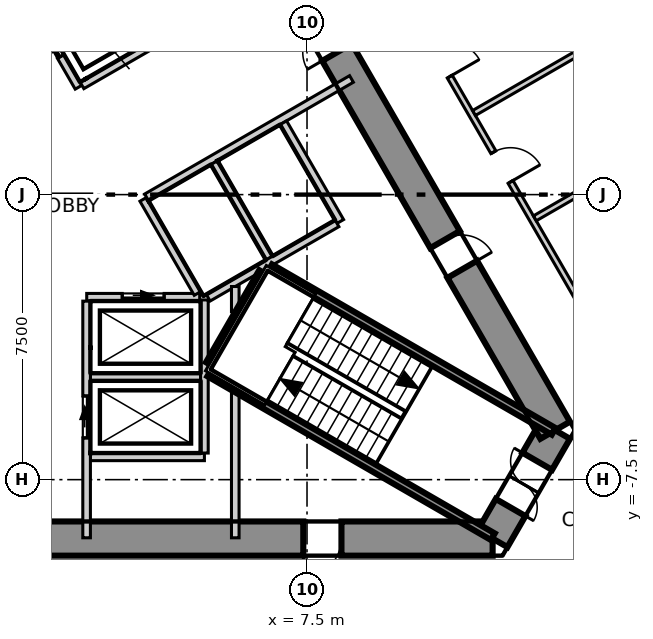
"""IFC4 building model, lengths in metres.
Left out: names, types, materials, properties, quantities, classifications, styles, units other than length and angle.
Written with IfcOpenShell. Run it as: python <this file> out.ifc"""

import sys

from ifc_helpers import new_model, si_unit, direction, frame, frame_2d, origin, place, context, subcontext, project, spatial, polyline, rectangle, outline, extrude, element, fill, save


model = new_model("IFC4")
c1 = context("Model", 3, precision=1e-05, world=origin(), true_north=direction((0.0, 1.0)))
c2 = subcontext(c1, "Body", "Model", "MODEL_VIEW")
j1 = project(units=[si_unit("LENGTHUNIT", "METRE"), si_unit("PLANEANGLEUNIT", "RADIAN")], contexts=[c1])
p1 = place(None, origin())
s1 = spatial("IfcSite", under=j1, at=p1, CompositionType="ELEMENT")
p2 = place(p1, origin())
s2 = spatial("IfcBuilding", under=s1, at=p2, CompositionType="ELEMENT")
p3 = place(p2, frame((0.0, 0.0, 71.3)))
s3 = spatial("IfcBuildingStorey", under=s2, at=p3, CompositionType="ELEMENT", Elevation=71.3)
p4 = place(p3, frame((-12.384, -9.05, -0.3), z_axis=(0.0, 0.0, 1.0), x_axis=(1.0, 0.0, 0.0)))
e1 = element("IfcWall", 1, at=p4, inside=s3, PredefinedType="SHEAR", context=c2, shape_type="SweptSolid", body=[
    extrude(outline(polyline([(-0.26, -0.45), (1.685, -0.45), (3.63, -0.45), (5.576, -0.45), (7.521, -0.45), (9.466, -0.45), (11.411, -0.45), (13.357, -0.45), (15.302, -0.45), (17.247, -0.45), (19.192, -0.45), (21.138, -0.45), (23.083, -0.45), (25.028, -0.45), (24.508, 0.45), (22.643, 0.45), (20.778, 0.45), (18.912, 0.45), (17.047, 0.45), (15.182, 0.45), (13.317, 0.45), (11.451, 0.45), (9.586, 0.45), (7.721, 0.45), (5.856, 0.45), (3.99, 0.45), (2.125, 0.45), (0.26, 0.45), (-0.26, -0.45)])), origin(), (0.0, 0.0, 1.0), 4.0),
])
p5 = place(p4, frame((8.548, 0.0, 0.3)))
e2 = element("IfcOpeningElement", 2, at=p5, cuts=e1, PredefinedType="OPENING", context=c2, shape_type="SweptSolid", body=[
    extrude(rectangle(XDim=0.9, YDim=2.1, at=frame_2d((0.45, 1.05))), frame((0.0, 0.46, 0.0), z_axis=(0.0, -1.0, 0.0), x_axis=(1.0, 0.0, 0.0)), (0.0, 0.0, 1.0), 0.92),
])
p6 = place(p4, frame((19.788, 0.0, 0.3)))
e3 = element("IfcOpeningElement", 3, at=p6, cuts=e1, PredefinedType="OPENING", context=c2, shape_type="SweptSolid", body=[
    extrude(rectangle(XDim=1.0, YDim=2.1, at=frame_2d((0.5, 1.05))), frame((0.0, 0.46, 0.0), z_axis=(0.0, -1.0, 0.0), x_axis=(1.0, 0.0, 0.0)), (0.0, 0.0, 1.0), 0.92),
])
p7 = place(p3, frame((12.384, -9.05, -0.3), z_axis=(0.0, 0.0, 1.0), x_axis=(0.500111984565, 0.865960739811, 0.0)))
e4 = element("IfcWall", 4, at=p7, inside=s3, PredefinedType="SHEAR", context=c2, shape_type="SweptSolid", body=[
    extrude(outline(polyline([(-0.26, -0.45), (1.646, -0.449), (3.551, -0.449), (3.031, 0.45), (1.646, 0.45), (0.26, 0.45), (-0.26, -0.45)])), origin(), (0.0, 0.0, 1.0), 4.0),
])
p8 = place(p7, frame((0.946, 0.0, 0.3)))
e5 = element("IfcOpeningElement", 5, at=p8, cuts=e4, PredefinedType="OPENING", context=c2, shape_type="SweptSolid", body=[
    extrude(rectangle(XDim=1.4, YDim=2.1, at=frame_2d((0.7, 1.05))), frame((0.0, 0.46, 0.0), z_axis=(0.0, -1.0, 0.0), x_axis=(1.0, 0.0, 0.0)), (0.0, 0.0, 1.0), 0.92),
])
p9 = place(p3, frame((14.03, -6.2, -0.3), z_axis=(0.0, 0.0, 1.0), x_axis=(-0.500026485275, 0.866010111964, 0.0)))
e6 = element("IfcWall", 6, at=p9, inside=s3, PredefinedType="SHEAR", context=c2, shape_type="SweptSolid", body=[
    extrude(outline(polyline([(-0.26, -0.449), (1.685, -0.449), (3.63, -0.449), (5.576, -0.449), (7.521, -0.449), (9.466, -0.449), (11.411, -0.449), (13.357, -0.449), (15.302, -0.449), (17.247, -0.45), (19.192, -0.45), (21.138, -0.45), (23.083, -0.45), (25.028, -0.45), (24.509, 0.449), (22.644, 0.449), (20.778, 0.449), (18.913, 0.449), (17.048, 0.449), (15.182, 0.449), (13.317, 0.449), (11.452, 0.449), (9.587, 0.449), (7.721, 0.45), (5.856, 0.45), (3.991, 0.45), (2.125, 0.45), (0.26, 0.45), (-0.26, -0.449)])), origin(), (0.0, 0.0, 1.0), 4.0),
])
p10 = place(p9, frame((11.484, 0.0, 0.3)))
e7 = element("IfcOpeningElement", 7, at=p10, cuts=e6, PredefinedType="OPENING", context=c2, shape_type="SweptSolid", body=[
    extrude(rectangle(XDim=1.8, YDim=2.1, at=frame_2d((0.9, 1.05))), frame((0.0, 0.46, 0.0), z_axis=(0.0, -1.0, 0.0), x_axis=(1.0, 0.0, 0.0)), (0.0, 0.0, 1.0), 0.92),
])
p11 = place(p9, frame((4.892, 0.0, 0.3)))
e8 = element("IfcOpeningElement", 8, at=p11, cuts=e6, PredefinedType="OPENING", context=c2, shape_type="SweptSolid", body=[
    extrude(rectangle(XDim=0.9, YDim=2.1, at=frame_2d((0.45, 1.05))), frame((0.0, 0.46, 0.0), z_axis=(0.0, -1.0, 0.0), x_axis=(1.0, 0.0, 0.0)), (0.0, 0.0, 1.0), 0.92),
])
p12 = place(p9, frame((18.976, 0.0, 0.3)))
e9 = element("IfcOpeningElement", 9, at=p12, cuts=e6, PredefinedType="OPENING", context=c2, shape_type="SweptSolid", body=[
    extrude(rectangle(XDim=0.9, YDim=2.1, at=frame_2d((0.45, 1.05))), frame((0.0, 0.46, 0.0), z_axis=(0.0, -1.0, 0.0), x_axis=(1.0, 0.0, 0.0)), (0.0, 0.0, 1.0), 0.92),
])
p13 = place(p3, frame((33.779, -15.662, 0.0), z_axis=(0.0, 0.0, 1.0), x_axis=(-0.500000131003, 0.86602532815, 0.0)))
e10 = element("IfcWall", 10, at=p13, inside=s3, PredefinedType="ELEMENTEDWALL", context=c2, shape_type="SweptSolid", body=[
    extrude(rectangle(XDim=60.886, YDim=0.2, at=frame_2d((30.443, 0.0))), origin(), (0.0, 0.0, 1.0), 3.7),
])
p14 = place(p13, frame((2.147, 0.0, 0.9)))
e11 = element("IfcOpeningElement", 11, at=p14, cuts=e10, PredefinedType="OPENING", context=c2, shape_type="SweptSolid", body=[
    extrude(rectangle(XDim=5.6, YDim=2.5, at=frame_2d((2.8, 1.25))), frame((0.0, 0.11, 0.0), z_axis=(0.0, -1.0, 0.0), x_axis=(1.0, 0.0, 0.0)), (0.0, 0.0, 1.0), 0.22),
])
p15 = place(p13, frame((9.434, 0.0, 0.9)))
e12 = element("IfcOpeningElement", 12, at=p15, cuts=e10, PredefinedType="OPENING", context=c2, shape_type="SweptSolid", body=[
    extrude(rectangle(XDim=5.6, YDim=2.5, at=frame_2d((2.8, 1.25))), frame((0.0, 0.11, 0.0), z_axis=(0.0, -1.0, 0.0), x_axis=(1.0, 0.0, 0.0)), (0.0, 0.0, 1.0), 0.22),
])
p16 = place(p13, frame((16.722, 0.0, 0.9)))
e13 = element("IfcOpeningElement", 13, at=p16, cuts=e10, PredefinedType="OPENING", context=c2, shape_type="SweptSolid", body=[
    extrude(rectangle(XDim=5.6, YDim=2.5, at=frame_2d((2.8, 1.25))), frame((0.0, 0.11, 0.0), z_axis=(0.0, -1.0, 0.0), x_axis=(1.0, 0.0, 0.0)), (0.0, 0.0, 1.0), 0.22),
])
p17 = place(p13, frame((24.009, 0.0, 0.9)))
e14 = element("IfcOpeningElement", 14, at=p17, cuts=e10, PredefinedType="OPENING", context=c2, shape_type="SweptSolid", body=[
    extrude(rectangle(XDim=5.6, YDim=2.5, at=frame_2d((2.8, 1.25))), frame((0.0, 0.11, 0.0), z_axis=(0.0, -1.0, 0.0), x_axis=(1.0, 0.0, 0.0)), (0.0, 0.0, 1.0), 0.22),
])
p18 = place(p13, frame((31.297, 0.0, 0.9)))
e15 = element("IfcOpeningElement", 15, at=p18, cuts=e10, PredefinedType="OPENING", context=c2, shape_type="SweptSolid", body=[
    extrude(rectangle(XDim=5.6, YDim=2.5, at=frame_2d((2.8, 1.25))), frame((0.0, 0.11, 0.0), z_axis=(0.0, -1.0, 0.0), x_axis=(1.0, 0.0, 0.0)), (0.0, 0.0, 1.0), 0.22),
])
p19 = place(p13, frame((38.584, 0.0, 0.9)))
e16 = element("IfcOpeningElement", 16, at=p19, cuts=e10, PredefinedType="OPENING", context=c2, shape_type="SweptSolid", body=[
    extrude(rectangle(XDim=5.6, YDim=2.5, at=frame_2d((2.8, 1.25))), frame((0.0, 0.11, 0.0), z_axis=(0.0, -1.0, 0.0), x_axis=(1.0, 0.0, 0.0)), (0.0, 0.0, 1.0), 0.22),
])
p20 = place(p13, frame((45.872, 0.0, 0.9)))
e17 = element("IfcOpeningElement", 17, at=p20, cuts=e10, PredefinedType="OPENING", context=c2, shape_type="SweptSolid", body=[
    extrude(rectangle(XDim=5.6, YDim=2.5, at=frame_2d((2.8, 1.25))), frame((0.0, 0.11, 0.0), z_axis=(0.0, -1.0, 0.0), x_axis=(1.0, 0.0, 0.0)), (0.0, 0.0, 1.0), 0.22),
])
p21 = place(p13, frame((53.16, 0.0, 0.9)))
e18 = element("IfcOpeningElement", 18, at=p21, cuts=e10, PredefinedType="OPENING", context=c2, shape_type="SweptSolid", body=[
    extrude(rectangle(XDim=5.6, YDim=2.5, at=frame_2d((2.8, 1.25))), frame((0.0, 0.11, 0.0), z_axis=(0.0, -1.0, 0.0), x_axis=(1.0, 0.0, 0.0)), (0.0, 0.0, 1.0), 0.22),
])
p22 = place(p3, frame((0.075, 22.47, 0.0), z_axis=(0.0, 0.0, 1.0), x_axis=(0.500002280369, -0.866024087209, 0.0)))
e19 = element("IfcWall", 19, at=p22, inside=s3, PredefinedType="PARTITIONING", context=c2, shape_type="SweptSolid", body=[
    extrude(rectangle(XDim=38.844, YDim=0.15, at=frame_2d((19.422, 0.0))), origin(), (0.0, 0.0, 1.0), 3.7),
])
p23 = place(p22, frame((35.944, 0.0, 0.0)))
e20 = element("IfcOpeningElement", 20, at=p23, cuts=e19, PredefinedType="OPENING", context=c2, shape_type="SweptSolid", body=[
    extrude(rectangle(XDim=1.1, YDim=2.1, at=frame_2d((0.55, 1.05))), frame((0.0, 0.085, 0.0), z_axis=(0.0, -1.0, 0.0), x_axis=(1.0, 0.0, 0.0)), (0.0, 0.0, 1.0), 0.17),
])
p24 = place(p22, frame((29.848, 0.0, 0.0)))
e21 = element("IfcOpeningElement", 21, at=p24, cuts=e19, PredefinedType="OPENING", context=c2, shape_type="SweptSolid", body=[
    extrude(rectangle(XDim=1.0, YDim=2.1, at=frame_2d((0.5, 1.05))), frame((0.0, 0.085, 0.0), z_axis=(0.0, -1.0, 0.0), x_axis=(1.0, 0.0, 0.0)), (0.0, 0.0, 1.0), 0.17),
])
p25 = place(p22, frame((14.46, 0.0, 0.0)))
e22 = element("IfcOpeningElement", 22, at=p25, cuts=e19, PredefinedType="OPENING", context=c2, shape_type="SweptSolid", body=[
    extrude(rectangle(XDim=1.1, YDim=2.1, at=frame_2d((0.55, 1.05))), frame((0.0, 0.085, 0.0), z_axis=(0.0, -1.0, 0.0), x_axis=(1.0, 0.0, 0.0)), (0.0, 0.0, 1.0), 0.17),
])
p26 = place(p22, frame((24.66, 0.0, 0.0)))
e23 = element("IfcOpeningElement", 23, at=p26, cuts=e19, PredefinedType="OPENING", context=c2, shape_type="SweptSolid", body=[
    extrude(rectangle(XDim=0.9, YDim=2.1, at=frame_2d((0.45, 1.05))), frame((0.0, 0.085, 0.0), z_axis=(0.0, -1.0, 0.0), x_axis=(1.0, 0.0, 0.0)), (0.0, 0.0, 1.0), 0.17),
])
p27 = place(p22, frame((21.46, 0.0, 0.0)))
e24 = element("IfcOpeningElement", 24, at=p27, cuts=e19, PredefinedType="OPENING", context=c2, shape_type="SweptSolid", body=[
    extrude(rectangle(XDim=0.9, YDim=2.1, at=frame_2d((0.45, 1.05))), frame((0.0, 0.085, 0.0), z_axis=(0.0, -1.0, 0.0), x_axis=(1.0, 0.0, 0.0)), (0.0, 0.0, 1.0), 0.17),
])
p28 = place(p22, frame((18.66, 0.0, 0.0)))
e25 = element("IfcOpeningElement", 25, at=p28, cuts=e19, PredefinedType="OPENING", context=c2, shape_type="SweptSolid", body=[
    extrude(rectangle(XDim=1.0, YDim=2.1, at=frame_2d((0.5, 1.05))), frame((0.0, 0.085, 0.0), z_axis=(0.0, -1.0, 0.0), x_axis=(1.0, 0.0, 0.0)), (0.0, 0.0, 1.0), 0.17),
])
p29 = place(p22, frame((6.785, 0.0, 0.0)))
e26 = element("IfcOpeningElement", 26, at=p29, cuts=e19, PredefinedType="OPENING", context=c2, shape_type="SweptSolid", body=[
    extrude(rectangle(XDim=1.0, YDim=2.1, at=frame_2d((0.5, 1.05))), frame((0.0, 0.085, 0.0), z_axis=(0.0, -1.0, 0.0), x_axis=(1.0, 0.0, 0.0)), (0.0, 0.0, 1.0), 0.17),
])
p30 = place(p22, frame((10.485, 0.0, 0.0)))
e27 = element("IfcOpeningElement", 27, at=p30, cuts=e19, PredefinedType="OPENING", context=c2, shape_type="SweptSolid", body=[
    extrude(rectangle(XDim=0.9, YDim=2.1, at=frame_2d((0.45, 1.05))), frame((0.0, 0.085, 0.0), z_axis=(0.0, -1.0, 0.0), x_axis=(1.0, 0.0, 0.0)), (0.0, 0.0, 1.0), 0.17),
])
p31 = place(p22, frame((1.796, 0.0, 0.0)))
e28 = element("IfcOpeningElement", 28, at=p31, cuts=e19, PredefinedType="OPENING", context=c2, shape_type="SweptSolid", body=[
    extrude(rectangle(XDim=1.1, YDim=2.1, at=frame_2d((0.55, 1.05))), frame((0.0, 0.085, 0.0), z_axis=(0.0, -1.0, 0.0), x_axis=(1.0, 0.0, 0.0)), (0.0, 0.0, 1.0), 0.17),
])
p32 = place(p3, frame((12.148, 8.76, 0.0), z_axis=(0.0, 0.0, 1.0), x_axis=(0.499970334739, -0.866042530354, 0.0)))
e29 = element("IfcWall", 29, at=p32, inside=s3, PredefinedType="PARTITIONING", context=c2, shape_type="SweptSolid", body=[
    extrude(rectangle(XDim=8.725, YDim=0.15, at=frame_2d((4.362, 0.0))), origin(), (0.0, 0.0, 1.0), 3.7),
])
p33 = place(p3, frame((11.895, 2.148, 0.0), z_axis=(0.0, 0.0, 1.0), x_axis=(0.866031223622, 0.49998991961, 0.0)))
e30 = element("IfcWall", 30, at=p33, inside=s3, PredefinedType="PARTITIONING", context=c2, shape_type="SweptSolid", body=[
    extrude(rectangle(XDim=3.45, YDim=0.15, at=frame_2d((1.725, 0.0))), origin(), (0.0, 0.0, 1.0), 3.7),
])
p34 = place(p3, frame((13.495, -0.624, 0.0), z_axis=(0.0, 0.0, 1.0), x_axis=(0.866002028202, 0.500040485511, 0.0)))
e31 = element("IfcWall", 31, at=p34, inside=s3, PredefinedType="PARTITIONING", context=c2, shape_type="SweptSolid", body=[
    extrude(rectangle(XDim=9.968, YDim=0.15, at=frame_2d((4.984, 0.0))), origin(), (0.0, 0.0, 1.0), 3.7),
])
p35 = place(p3, frame((1.8, -4.8, 0.0), z_axis=(0.0, 0.0, 1.0), x_axis=(1.0, 0.0, 0.0)))
e32 = element("IfcWall", 32, at=p35, inside=s3, PredefinedType="SOLIDWALL", context=c2, shape_type="SweptSolid", body=[
    extrude(rectangle(XDim=2.9, YDim=0.2, at=frame_2d((1.45, 0.0))), origin(), (0.0, 0.0, 1.0), 3.7),
])
p36 = place(p3, frame((1.8, -6.9, 0.0), z_axis=(0.0, 0.0, 1.0), x_axis=(1.0, 0.0, 0.0)))
e33 = element("IfcWall", 33, at=p36, inside=s3, PredefinedType="SOLIDWALL", context=c2, shape_type="SweptSolid", body=[
    extrude(rectangle(XDim=3.0, YDim=0.2, at=frame_2d((1.5, 0.0))), origin(), (0.0, 0.0, 1.0), 3.7),
])
p37 = place(p3, frame((1.703, -2.7, 0.0), z_axis=(0.0, 0.0, 1.0), x_axis=(1.0, 0.0, 0.0)))
e34 = element("IfcWall", 34, at=p37, inside=s3, PredefinedType="SOLIDWALL", context=c2, shape_type="SweptSolid", body=[
    extrude(rectangle(XDim=2.973, YDim=0.2, at=frame_2d((1.487, 0.0))), origin(), (0.0, 0.0, 1.0), 3.7),
])
p38 = place(p37, frame((0.936, 0.0, 0.0)))
e35 = element("IfcOpeningElement", 35, at=p38, cuts=e34, PredefinedType="OPENING", context=c2, shape_type="SweptSolid", body=[
    extrude(rectangle(XDim=1.1, YDim=2.1, at=frame_2d((0.55, 1.05))), frame((0.0, 0.11, 0.0), z_axis=(0.0, -1.0, 0.0), x_axis=(1.0, 0.0, 0.0)), (0.0, 0.0, 1.0), 0.22),
])
p39 = place(p3, frame((0.0, 5.4, 0.0), z_axis=(0.0, 0.0, 1.0), x_axis=(0.500103862429, -0.865965430478, 0.0)))
e36 = element("IfcWall", 36, at=p39, inside=s3, PredefinedType="SOLIDWALL", context=c2, shape_type="SweptSolid", body=[
    extrude(rectangle(XDim=2.973, YDim=0.2, at=frame_2d((1.487, 0.0))), origin(), (0.0, 0.0, 1.0), 3.7),
])
p40 = place(p39, frame((0.937, 0.0, 0.0)))
e37 = element("IfcOpeningElement", 37, at=p40, cuts=e36, PredefinedType="OPENING", context=c2, shape_type="SweptSolid", body=[
    extrude(rectangle(XDim=1.1, YDim=2.1, at=frame_2d((0.55, 1.05))), frame((0.0, 0.11, 0.0), z_axis=(0.0, -1.0, 0.0), x_axis=(1.0, 0.0, 0.0)), (0.0, 0.0, 1.0), 0.22),
])
p41 = place(p3, frame((3.19, -0.125, 0.0), z_axis=(0.0, 0.0, 1.0), x_axis=(0.499988658015, -0.866031951983, 0.0)))
e38 = element("IfcWall", 38, at=p41, inside=s3, PredefinedType="SOLIDWALL", context=c2, shape_type="SweptSolid", body=[
    extrude(rectangle(XDim=2.858, YDim=0.2, at=frame_2d((1.429, 0.0))), origin(), (0.0, 0.0, 1.0), 3.7),
])
p42 = place(p3, frame((1.578, 2.874, 0.0), z_axis=(0.0, 0.0, 1.0), x_axis=(0.866031483044, 0.499989470266, 0.0)))
e39 = element("IfcWall", 39, at=p42, inside=s3, PredefinedType="SOLIDWALL", context=c2, shape_type="SweptSolid", body=[
    extrude(rectangle(XDim=6.226, YDim=0.2, at=frame_2d((3.113, 0.0))), origin(), (0.0, 0.0, 1.0), 3.7),
])
p43 = place(p42, frame((2.496, 0.0, 0.0)))
e40 = element("IfcOpeningElement", 40, at=p43, cuts=e39, PredefinedType="OPENING", context=c2, shape_type="SweptSolid", body=[
    extrude(rectangle(XDim=1.1, YDim=2.1, at=frame_2d((0.55, 1.05))), frame((0.0, 0.11, 0.0), z_axis=(0.0, -1.0, 0.0), x_axis=(1.0, 0.0, 0.0)), (0.0, 0.0, 1.0), 0.22),
])
p44 = place(p3, frame((1.7, -9.03, 0.0), z_axis=(0.0, 0.0, 1.0), x_axis=(0.0, 1.0, 0.0)))
e41 = element("IfcWall", 41, at=p44, inside=s3, PredefinedType="SOLIDWALL", context=c2, shape_type="SweptSolid", body=[
    extrude(rectangle(XDim=6.227, YDim=0.2, at=frame_2d((3.114, 0.0))), origin(), (0.0, 0.0, 1.0), 3.7),
])
p45 = place(p44, frame((2.63, 0.0, 0.0)))
e42 = element("IfcOpeningElement", 42, at=p45, cuts=e41, PredefinedType="OPENING", context=c2, shape_type="SweptSolid", body=[
    extrude(rectangle(XDim=1.1, YDim=2.1, at=frame_2d((0.55, 1.05))), frame((0.0, 0.11, 0.0), z_axis=(0.0, -1.0, 0.0), x_axis=(1.0, 0.0, 0.0)), (0.0, 0.0, 1.0), 0.22),
])
p46 = place(p3, frame((4.8, -6.8, 0.0), z_axis=(0.0, 0.0, 1.0), x_axis=(0.0, 1.0, 0.0)))
e43 = element("IfcWall", 43, at=p46, inside=s3, PredefinedType="SOLIDWALL", context=c2, shape_type="SweptSolid", body=[
    extrude(rectangle(XDim=4.029, YDim=0.2, at=frame_2d((2.015, 0.0))), origin(), (0.0, 0.0, 1.0), 3.7),
])
p47 = place(p3, frame((3.278, -0.071, 0.0), z_axis=(0.0, 0.0, 1.0), x_axis=(0.865953757655, 0.500124074208, 0.0)))
e44 = element("IfcWall", 44, at=p47, inside=s3, PredefinedType="SOLIDWALL", context=c2, shape_type="SweptSolid", body=[
    extrude(rectangle(XDim=6.227, YDim=0.2, at=frame_2d((3.113, 0.0))), origin(), (0.0, 0.0, 1.0), 3.7),
])
p48 = place(p3, frame((6.876, 1.891, 0.0), z_axis=(0.0, 0.0, 1.0), x_axis=(0.499990139034, -0.866031096941, 0.0)))
e45 = element("IfcWall", 45, at=p48, inside=s3, PredefinedType="SOLIDWALL", context=c2, shape_type="SweptSolid", body=[
    extrude(rectangle(XDim=3.0, YDim=0.2, at=frame_2d((1.5, 0.0))), origin(), (0.0, 0.0, 1.0), 3.7),
])
p49 = place(p3, frame((5.057, 0.841, 0.0), z_axis=(0.0, 0.0, 1.0), x_axis=(0.50012328804, -0.865954211699, 0.0)))
e46 = element("IfcWall", 46, at=p49, inside=s3, PredefinedType="SOLIDWALL", context=c2, shape_type="SweptSolid", body=[
    extrude(rectangle(XDim=2.9, YDim=0.2, at=frame_2d((1.45, 0.0))), origin(), (0.0, 0.0, 1.0), 3.7),
])
p50 = place(p3, frame((4.9, -2.714, 0.0), z_axis=(0.0, 0.0, 1.0), x_axis=(0.865992350556, 0.500057245502, 0.0)))
e47 = element("IfcWall", 47, at=p50, inside=s3, PredefinedType="SOLIDWALL", context=c2, shape_type="SweptSolid", body=[
    extrude(rectangle(XDim=3.914, YDim=0.2, at=frame_2d((1.957, 0.0))), origin(), (0.0, 0.0, 1.0), 3.7),
])
p51 = place(p3, frame((5.612, -9.03, 0.0), z_axis=(0.0, 0.0, 1.0), x_axis=(0.0, 1.0, 0.0)))
e48 = element("IfcWall", 48, at=p51, inside=s3, PredefinedType="SOLIDWALL", context=c2, shape_type="SweptSolid", body=[
    extrude(rectangle(XDim=3.827, YDim=0.2, at=frame_2d((1.914, 0.0))), origin(), (0.0, 0.0, 1.0), 3.7),
])
p52 = place(p3, frame((5.612, -3.08, 0.0), z_axis=(0.0, 0.0, 1.0), x_axis=(0.0, 1.0, 0.0)))
e49 = element("IfcWall", 49, at=p52, inside=s3, PredefinedType="SOLIDWALL", context=c2, shape_type="SweptSolid", body=[
    extrude(rectangle(XDim=0.662, YDim=0.2, at=frame_2d((0.331, 0.0))), origin(), (0.0, 0.0, 1.0), 3.7),
])
p53 = place(p3, frame((4.929, -4.693, 0.0), z_axis=(0.0, 0.0, 1.0), x_axis=(0.866010975815, -0.500024989144, 0.0)))
e50 = element("IfcWall", 50, at=p53, inside=s3, PredefinedType="SOLIDWALL", context=c2, shape_type="SweptSolid", body=[
    extrude(rectangle(XDim=8.615, YDim=0.2, at=frame_2d((4.308, 0.0))), origin(), (0.0, 0.0, 1.0), 3.7),
])
p54 = place(p3, frame((4.929, -4.462, 0.0), z_axis=(0.0, 0.0, 1.0), x_axis=(0.500200581029, 0.865909567298, 0.0)))
e51 = element("IfcWall", 51, at=p54, inside=s3, PredefinedType="SOLIDWALL", context=c2, shape_type="SweptSolid", body=[
    extrude(rectangle(XDim=2.799, YDim=0.2, at=frame_2d((1.399, 0.0))), origin(), (0.0, 0.0, 1.0), 3.7),
])
p55 = place(p3, frame((6.529, -1.922, 0.0), z_axis=(0.0, 0.0, 1.0), x_axis=(0.866060059011, -0.499939970583, 0.0)))
e52 = element("IfcWall", 52, at=p55, inside=s3, PredefinedType="SOLIDWALL", context=c2, shape_type="SweptSolid", body=[
    extrude(rectangle(XDim=8.615, YDim=0.2, at=frame_2d((4.307, 0.0))), origin(), (0.0, 0.0, 1.0), 3.7),
])
p56 = place(p38, origin())
e53 = element("IfcDoor", 53, at=p56, inside=s3, OperationType="SLIDING_TO_LEFT", PredefinedType="DOOR", context=c2, shape_type="SweptSolid", body=[
    extrude(rectangle(XDim=1.1, YDim=2.1, at=frame_2d((0.55, 1.05))), frame((0.0, 0.025, 0.0), z_axis=(0.0, -1.0, 0.0), x_axis=(1.0, 0.0, 0.0)), (0.0, 0.0, 1.0), 0.05),
])
fill(e35, e53)
p57 = place(p45, origin())
e54 = element("IfcDoor", 54, at=p57, inside=s3, OperationType="SLIDING_TO_LEFT", PredefinedType="DOOR", context=c2, shape_type="SweptSolid", body=[
    extrude(rectangle(XDim=1.1, YDim=2.1, at=frame_2d((0.55, 1.05))), frame((0.0, 0.025, 0.0), z_axis=(0.0, -1.0, 0.0), x_axis=(1.0, 0.0, 0.0)), (0.0, 0.0, 1.0), 0.05),
])
fill(e42, e54)
p58 = place(p40, origin())
e55 = element("IfcDoor", 55, at=p58, inside=s3, OperationType="SLIDING_TO_LEFT", PredefinedType="DOOR", context=c2, shape_type="SweptSolid", body=[
    extrude(rectangle(XDim=1.1, YDim=2.1, at=frame_2d((0.55, 1.05))), frame((0.0, 0.025, 0.0), z_axis=(0.0, -1.0, 0.0), x_axis=(1.0, 0.0, 0.0)), (0.0, 0.0, 1.0), 0.05),
])
fill(e37, e55)
p59 = place(p26, origin())
e56 = element("IfcDoor", 56, at=p59, inside=s3, OperationType="SINGLE_SWING_LEFT", PredefinedType="DOOR", context=c2, shape_type="SweptSolid", body=[
    extrude(rectangle(XDim=0.9, YDim=2.1, at=frame_2d((0.45, 1.05))), frame((0.0, 0.025, 0.0), z_axis=(0.0, -1.0, 0.0), x_axis=(1.0, 0.0, 0.0)), (0.0, 0.0, 1.0), 0.05),
])
fill(e23, e56)
p60 = place(p27, origin())
e57 = element("IfcDoor", 57, at=p60, inside=s3, OperationType="SINGLE_SWING_LEFT", PredefinedType="DOOR", context=c2, shape_type="SweptSolid", body=[
    extrude(rectangle(XDim=0.9, YDim=2.1, at=frame_2d((0.45, 1.05))), frame((0.0, 0.025, 0.0), z_axis=(0.0, -1.0, 0.0), x_axis=(1.0, 0.0, 0.0)), (0.0, 0.0, 1.0), 0.05),
])
fill(e24, e57)
p61 = place(p10, origin())
e58 = element("IfcDoor", 58, at=p61, inside=s3, OperationType="DOUBLE_DOOR_SINGLE_SWING", PredefinedType="DOOR", context=c2, shape_type="SweptSolid", body=[
    extrude(rectangle(XDim=1.8, YDim=2.1, at=frame_2d((0.9, 1.05))), frame((0.0, 0.025, 0.0), z_axis=(0.0, -1.0, 0.0), x_axis=(1.0, 0.0, 0.0)), (0.0, 0.0, 1.0), 0.05),
])
fill(e7, e58)
p62 = place(p8, origin())
e59 = element("IfcDoor", 59, at=p62, inside=s3, OperationType="DOUBLE_DOOR_SINGLE_SWING", PredefinedType="DOOR", context=c2, shape_type="SweptSolid", body=[
    extrude(rectangle(XDim=1.4, YDim=2.1, at=frame_2d((0.7, 1.05))), frame((0.0, 0.025, 0.0), z_axis=(0.0, -1.0, 0.0), x_axis=(1.0, 0.0, 0.0)), (0.0, 0.0, 1.0), 0.05),
])
fill(e5, e59)
p63 = place(p6, origin())
e60 = element("IfcDoor", 60, at=p63, inside=s3, OperationType="SINGLE_SWING_LEFT", PredefinedType="DOOR", context=c2, shape_type="SweptSolid", body=[
    extrude(rectangle(XDim=1.0, YDim=2.1, at=frame_2d((0.5, 1.05))), frame((0.0, 0.175, 0.0), z_axis=(0.0, -1.0, 0.0), x_axis=(1.0, 0.0, 0.0)), (0.0, 0.0, 1.0), 0.05),
])
fill(e3, e60)
p64 = place(p11, origin())
e61 = element("IfcDoor", 61, at=p64, inside=s3, OperationType="SINGLE_SWING_LEFT", PredefinedType="DOOR", context=c2, shape_type="SweptSolid", body=[
    extrude(rectangle(XDim=0.9, YDim=2.1, at=frame_2d((0.45, 1.05))), frame((0.0, 0.025, 0.0), z_axis=(0.0, -1.0, 0.0), x_axis=(1.0, 0.0, 0.0)), (0.0, 0.0, 1.0), 0.05),
])
fill(e8, e61)
save(model, sys.argv[1])
